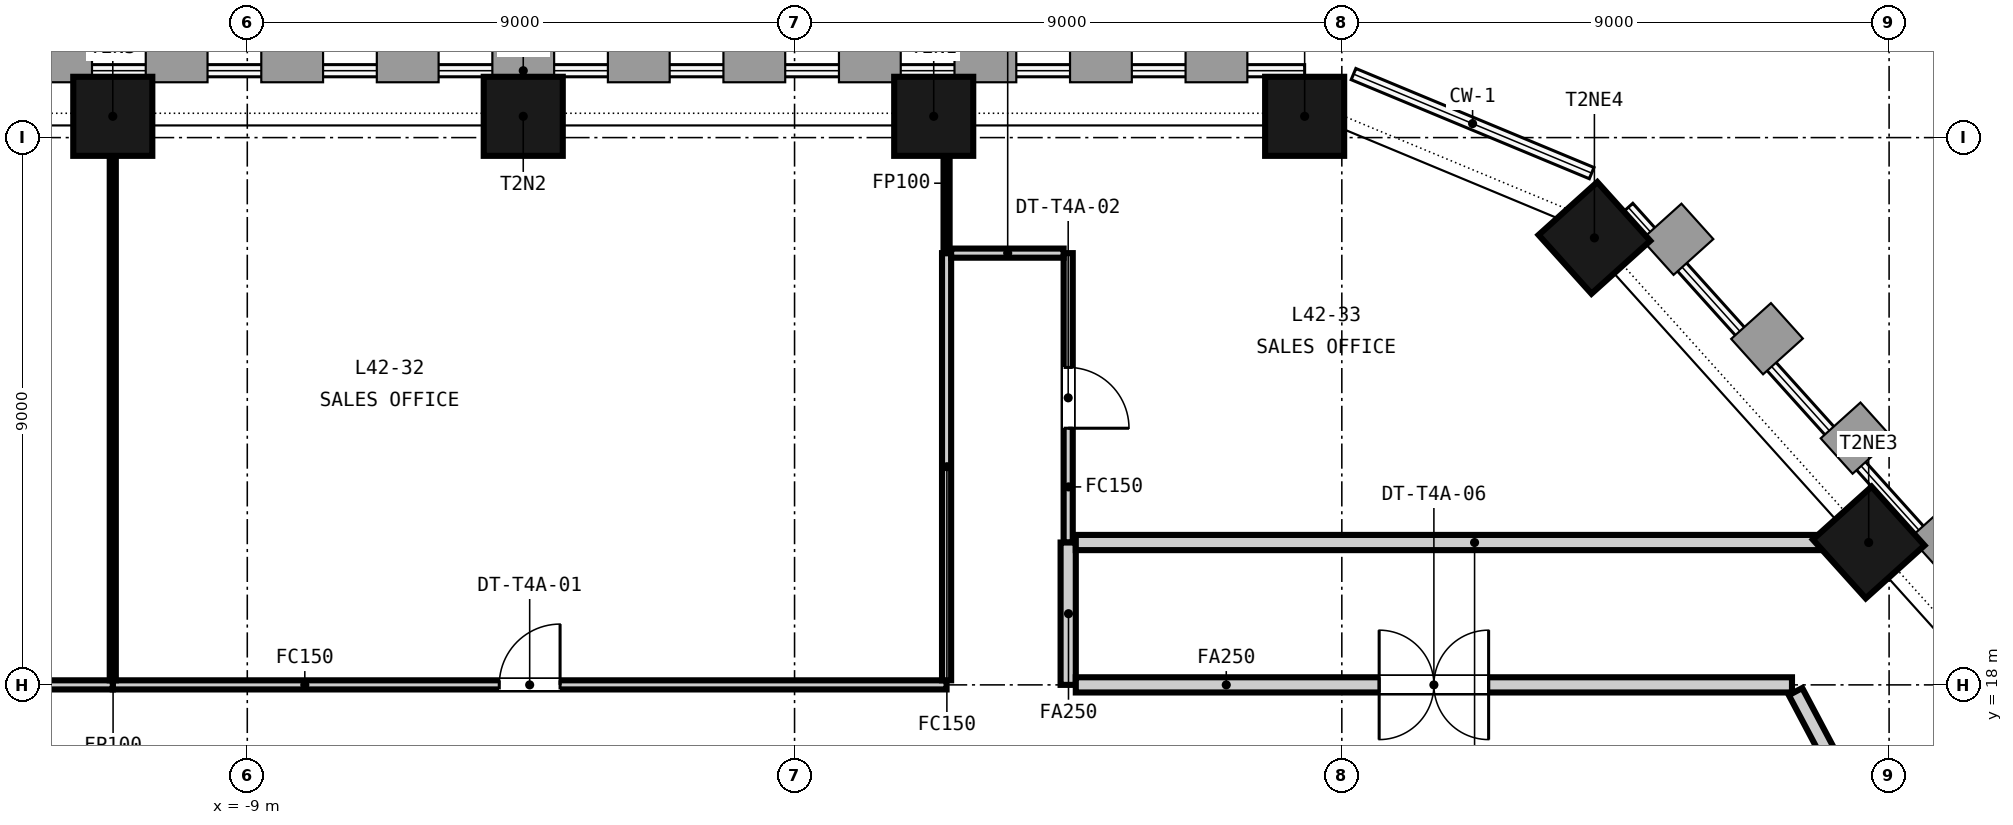
"""IFC4 building model, lengths in metres.
Left out: names, types, materials, properties, quantities, classifications, styles, units other than length and angle.
Written with IfcOpenShell. Run it as: python <this file> out.ifc"""

import sys

from ifc_helpers import new_model, si_unit, direction, frame, frame_2d, origin, origin_2d, place, context, subcontext, project, spatial, rectangle, extrude, element, fill, save


model = new_model("IFC4")
c1 = context("Model", 3, precision=1e-05, world=origin(), true_north=direction((0.0, 1.0)))
c2 = subcontext(c1, "Body", "Model", "MODEL_VIEW")
j1 = project(units=[si_unit("LENGTHUNIT", "METRE"), si_unit("PLANEANGLEUNIT", "RADIAN")], contexts=[c1])
p1 = place(None, origin())
s1 = spatial("IfcSite", under=j1, at=p1, CompositionType="ELEMENT")
p2 = place(p1, origin())
s2 = spatial("IfcBuilding", under=s1, at=p2, CompositionType="ELEMENT")
p3 = place(p2, frame((0.0, 0.0, 170.8)))
s3 = spatial("IfcBuildingStorey", under=s2, at=p3, CompositionType="ELEMENT", Elevation=170.8)
for number, where, z_axis, x_axis in (
    (1, (8.389, 27.35, -0.15), (0.0, 0.0, 1.0), (-1.0, 0.0, 0.0)),
    (2, (2.288, 27.35, -0.15), (0.0, 0.0, 1.0), (-1.0, 0.0, 0.0)),
    (3, (-4.462, 27.35, -0.15), (0.0, 0.0, 1.0), (-1.0, 0.0, 0.0)),
    (4, (-11.212, 27.35, -0.15), (0.0, 0.0, 1.0), (-1.0, 0.0, 0.0)),
    (5, (17.664, 20.342, -0.15), (0.0, 0.0, 1.0), (-0.669, 0.743, 0.0)),
    (6, (13.154, 25.351, -0.15), (0.0, 0.0, 1.0), (-0.669, 0.743, 0.0)),
):
    element("IfcColumn", number, at=place(p3, frame(where, z_axis=z_axis, x_axis=x_axis)), inside=s3, PredefinedType="COLUMN", context=c2, shape_type="SweptSolid", body=[
        extrude(rectangle(XDim=1.3, YDim=1.3, at=origin_2d()), origin(), (0.0, 0.0, 1.0), 3.65),
    ])
p4 = place(p3, frame((4.5, 25.1, 0.0), z_axis=(0.0, 0.0, 1.0), x_axis=(0.0, -1.0, 0.0)))
e7 = element("IfcWall", 7, at=p4, inside=s3, PredefinedType="PARTITIONING", context=c2, shape_type="SweptSolid", body=[
    extrude(rectangle(XDim=4.759, YDim=0.15, at=frame_2d((2.379, 0.0))), origin(), (0.0, 0.0, 1.0), 2.741),
])
p5 = place(p4, frame((1.879, 0.0, 0.0)))
e8 = element("IfcOpeningElement", 8, at=p5, cuts=e7, PredefinedType="OPENING", context=c2, shape_type="SweptSolid", body=[
    extrude(rectangle(XDim=1.0, YDim=2.1, at=frame_2d((0.5, 1.05))), frame((0.0, 0.085, 0.0), z_axis=(0.0, -1.0, 0.0), x_axis=(1.0, 0.0, 0.0)), (0.0, 0.0, 1.0), 0.17),
])
p6 = place(p3, frame((4.5, 20.341, 0.0), z_axis=(0.0, 0.0, 1.0), x_axis=(0.0, -1.0, 0.0)))
e9 = element("IfcWall", 9, at=p6, inside=s3, PredefinedType="PARTITIONING", context=c2, shape_type="SweptSolid", body=[
    extrude(rectangle(XDim=2.341, YDim=0.25, at=frame_2d((1.17, 0.0))), origin(), (0.0, 0.0, 1.0), 2.741),
])
p7 = place(p3, frame((-11.212, 18.0, 0.0), z_axis=(0.0, 0.0, 1.0), x_axis=(1.0, 0.0, 0.0)))
e10 = element("IfcWall", 10, at=p7, inside=s3, PredefinedType="PARTITIONING", context=c2, shape_type="SweptSolid", body=[
    extrude(rectangle(XDim=13.712, YDim=0.15, at=frame_2d((6.856, 0.0))), origin(), (0.0, 0.0, 1.0), 2.741),
])
p8 = place(p7, frame((6.356, 0.0, 0.0)))
e11 = element("IfcOpeningElement", 11, at=p8, cuts=e10, PredefinedType="OPENING", context=c2, shape_type="SweptSolid", body=[
    extrude(rectangle(XDim=1.0, YDim=2.1, at=frame_2d((0.5, 1.05))), frame((0.0, 0.085, 0.0), z_axis=(0.0, -1.0, 0.0), x_axis=(1.0, 0.0, 0.0)), (0.0, 0.0, 1.0), 0.17),
])
p9 = place(p3, frame((2.5, 18.075, 0.0), z_axis=(0.0, 0.0, 1.0), x_axis=(0.0, 1.0, 0.0)))
e12 = element("IfcWall", 12, at=p9, inside=s3, PredefinedType="PARTITIONING", context=c2, shape_type="SweptSolid", body=[
    extrude(rectangle(XDim=7.025, YDim=0.15, at=frame_2d((3.513, 0.0))), origin(), (0.0, 0.0, 1.0), 2.741),
])
p10 = place(p3, frame((2.5, 25.1, 0.0), z_axis=(0.0, 0.0, 1.0), x_axis=(0.0, 1.0, 0.0)))
e13 = element("IfcWall", 13, at=p10, inside=s3, PredefinedType="PARTITIONING", context=c2, shape_type="SweptSolid", body=[
    extrude(rectangle(XDim=2.3, YDim=0.1, at=frame_2d((1.15, 0.0))), origin(), (0.0, 0.0, 1.0), 2.741),
])
p11 = place(p3, frame((2.575, 25.1, 0.0), z_axis=(0.0, 0.0, 1.0), x_axis=(1.0, 0.0, 0.0)))
e14 = element("IfcWall", 14, at=p11, inside=s3, PredefinedType="PARTITIONING", context=c2, shape_type="SweptSolid", body=[
    extrude(rectangle(XDim=1.85, YDim=0.15, at=frame_2d((0.925, 0.0))), origin(), (0.0, 0.0, 1.0), 2.741),
])
p12 = place(p3, frame((4.625, 20.341, 0.0), z_axis=(0.0, 0.0, 1.0), x_axis=(1.0, 0.0, 0.0)))
e15 = element("IfcWall", 15, at=p12, inside=s3, PredefinedType="PARTITIONING", context=c2, shape_type="SweptSolid", body=[
    extrude(rectangle(XDim=13.106, YDim=0.25, at=frame_2d((6.553, 0.0))), origin(), (0.0, 0.0, 1.0), 2.741),
])
p13 = place(p3, frame((-16.328, 18.0, 0.0), z_axis=(0.0, 0.0, 1.0), x_axis=(1.0, 0.0, 0.0)))
e16 = element("IfcWall", 16, at=p13, inside=s3, PredefinedType="PARTITIONING", context=c2, shape_type="SweptSolid", body=[
    extrude(rectangle(XDim=5.116, YDim=0.15, at=frame_2d((2.558, 0.0))), origin(), (0.0, 0.0, 1.0), 2.741),
])
p14 = place(p3, frame((-11.212, 18.075, 0.0), z_axis=(0.0, 0.0, 1.0), x_axis=(0.0, 1.0, 0.0)))
e17 = element("IfcWall", 17, at=p14, inside=s3, PredefinedType="PARTITIONING", context=c2, shape_type="SweptSolid", body=[
    extrude(rectangle(XDim=9.325, YDim=0.1, at=frame_2d((4.663, 0.0))), origin(), (0.0, 0.0, 1.0), 2.741),
])
p15 = place(p3, frame((4.625, 18.0, 0.0), z_axis=(0.0, 0.0, 1.0), x_axis=(1.0, 0.0, 0.0)))
e18 = element("IfcWall", 18, at=p15, inside=s3, PredefinedType="PARTITIONING", context=c2, shape_type="SweptSolid", body=[
    extrude(rectangle(XDim=11.778, YDim=0.25, at=frame_2d((5.889, 0.0))), origin(), (0.0, 0.0, 1.0), 2.741),
])
p16 = place(p15, frame((4.989, 0.0, 0.0)))
e19 = element("IfcOpeningElement", 19, at=p16, cuts=e18, PredefinedType="OPENING", context=c2, shape_type="SweptSolid", body=[
    extrude(rectangle(XDim=1.8, YDim=2.1, at=frame_2d((0.9, 1.05))), frame((0.0, 0.135, 0.0), z_axis=(0.0, -1.0, 0.0), x_axis=(1.0, 0.0, 0.0)), (0.0, 0.0, 1.0), 0.27),
])
p17 = place(p3, frame((16.461, 17.889, 0.0), z_axis=(0.0, 0.0, 1.0), x_axis=(0.467911961302, -0.883775082513, 0.0)))
e20 = element("IfcWall", 20, at=p17, inside=s3, PredefinedType="PARTITIONING", context=c2, shape_type="SweptSolid", body=[
    extrude(rectangle(XDim=10.643, YDim=0.25, at=frame_2d((5.322, 0.0))), origin(), (0.0, 0.0, 1.0), 2.741),
])
p18 = place(p8, origin())
e21 = element("IfcDoor", 21, at=p18, inside=s3, OperationType="SINGLE_SWING_RIGHT", PredefinedType="DOOR", context=c2, shape_type="SweptSolid", body=[
    extrude(rectangle(XDim=1.0, YDim=2.1, at=frame_2d((0.5, 1.05))), frame((0.0, 0.025, 0.0), z_axis=(0.0, -1.0, 0.0), x_axis=(1.0, 0.0, 0.0)), (0.0, 0.0, 1.0), 0.05),
])
fill(e11, e21)
p19 = place(p5, origin())
e22 = element("IfcDoor", 22, at=p19, inside=s3, OperationType="SINGLE_SWING_RIGHT", PredefinedType="DOOR", context=c2, shape_type="SweptSolid", body=[
    extrude(rectangle(XDim=1.0, YDim=2.1, at=frame_2d((0.5, 1.05))), frame((0.0, 0.025, 0.0), z_axis=(0.0, -1.0, 0.0), x_axis=(1.0, 0.0, 0.0)), (0.0, 0.0, 1.0), 0.05),
])
fill(e8, e22)
p20 = place(p16, origin())
e23 = element("IfcDoor", 23, at=p20, inside=s3, OperationType="DOUBLE_DOOR_DOUBLE_SWING", PredefinedType="DOOR", context=c2, shape_type="SweptSolid", body=[
    extrude(rectangle(XDim=1.8, YDim=2.1, at=frame_2d((0.9, 1.05))), frame((0.0, 0.025, 0.0), z_axis=(0.0, -1.0, 0.0), x_axis=(1.0, 0.0, 0.0)), (0.0, 0.0, 1.0), 0.05),
])
fill(e19, e23)
save(model, sys.argv[1])
